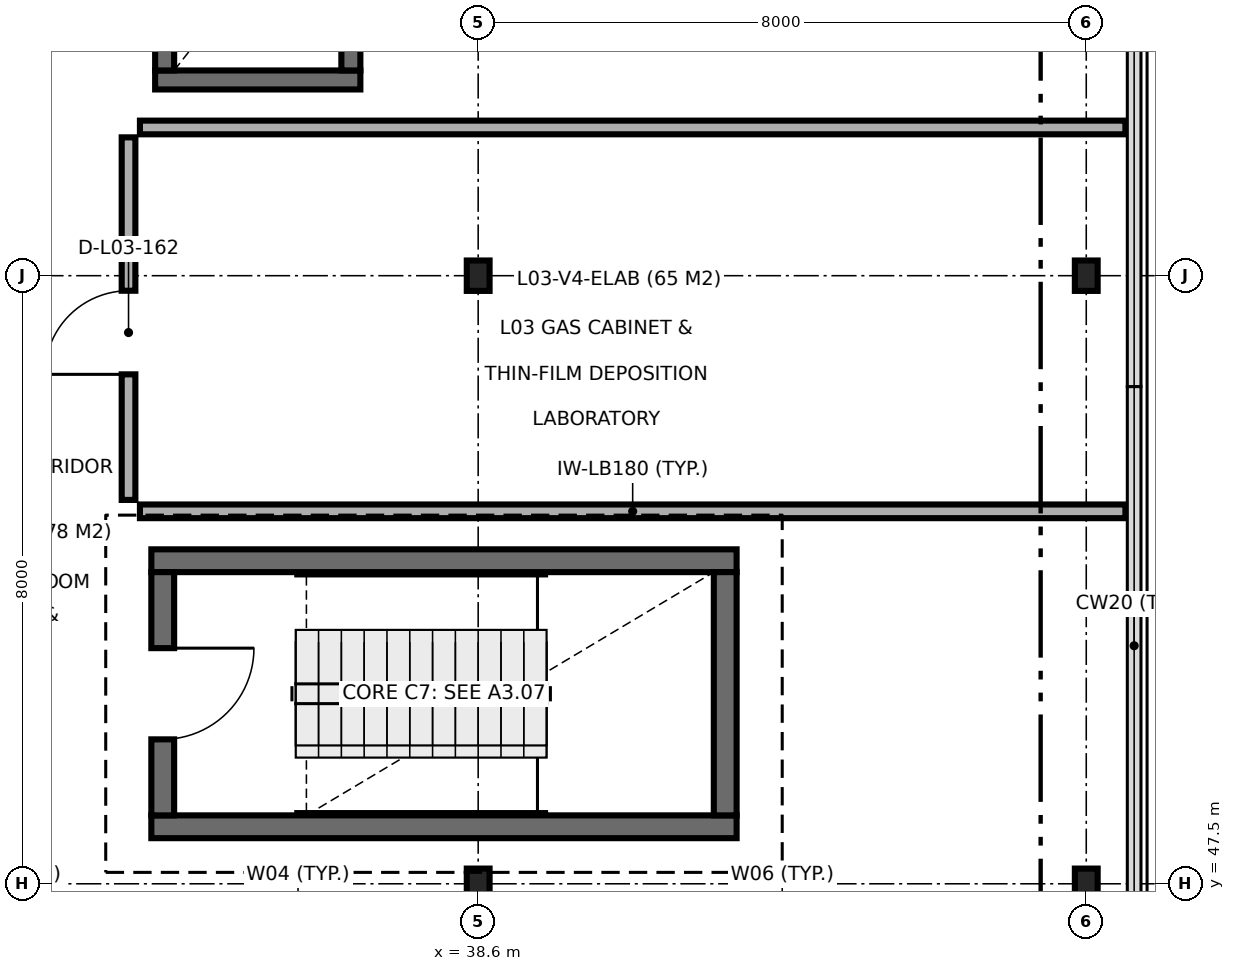
"""IFC4 building model, lengths in metres.
Left out: names, types, materials, properties, quantities, classifications, styles, units other than length and angle.
Written with IfcOpenShell. Run it as: python <this file> out.ifc"""

import sys

from ifc_helpers import new_model, si_unit, direction, frame, frame_2d, origin, origin_2d, place, context, subcontext, project, spatial, rectangle, i_section, extrude, element, fill, save


model = new_model("IFC4")
c1 = context("Model", 3, precision=1e-05, world=origin(), true_north=direction((0.0, 1.0)))
c2 = subcontext(c1, "Body", "Model", "MODEL_VIEW")
j1 = project(units=[si_unit("LENGTHUNIT", "METRE"), si_unit("PLANEANGLEUNIT", "RADIAN")], contexts=[c1])
p1 = place(None, origin())
s1 = spatial("IfcSite", under=j1, at=p1, CompositionType="ELEMENT")
p2 = place(p1, origin())
s2 = spatial("IfcBuilding", under=s1, at=p2, CompositionType="ELEMENT")
p3 = place(p2, frame((0.0, 0.0, 13.8)))
s3 = spatial("IfcBuildingStorey", under=s2, at=p3, CompositionType="ELEMENT", Elevation=13.8)
for number, where, z_axis, x_axis in (
    (1, (38.6, 47.5, 0.0), (0.0, 0.0, 1.0), (1.0, 0.0, 0.0)),
    (2, (38.6, 55.5, 0.0), (0.0, 0.0, 1.0), (1.0, 0.0, 0.0)),
    (3, (46.6, 47.5, 0.0), (0.0, 0.0, 1.0), (1.0, 0.0, 0.0)),
    (4, (46.6, 55.5, 0.0), (0.0, 0.0, 1.0), (1.0, 0.0, 0.0)),
):
    element("IfcColumn", number, at=place(p3, frame(where, z_axis=z_axis, x_axis=x_axis)), inside=s3, PredefinedType="COLUMN", context=c2, shape_type="SweptSolid", body=[
        extrude(i_section(OverallWidth=0.3, OverallDepth=0.4, WebThickness=0.013, FlangeThickness=0.024, FilletRadius=0.027, at=origin_2d()), origin(), (0.0, 0.0, 1.0), 4.5),
    ])
for number, where, z_axis, x_axis in (
    (5, (34.3, 48.25, 0.0), (0.0, 0.0, 1.0), (1.0, 0.0, 0.0)),
    (6, (42.0, 51.75, 0.0), (0.0, 0.0, 1.0), (-1.0, 0.0, 0.0)),
):
    element("IfcWall", number, at=place(p3, frame(where, z_axis=z_axis, x_axis=x_axis)), inside=s3, PredefinedType="SHEAR", context=c2, shape_type="SweptSolid", body=[
        extrude(rectangle(XDim=7.7, YDim=0.3, at=frame_2d((3.85, 0.0))), origin(), (0.0, 0.0, 1.0), 4.5),
    ])
p4 = place(p3, frame((34.45, 51.6, 0.0), z_axis=(0.0, 0.0, 1.0), x_axis=(0.0, -1.0, 0.0)))
e7 = element("IfcWall", 7, at=p4, inside=s3, PredefinedType="SHEAR", context=c2, shape_type="SweptSolid", body=[
    extrude(rectangle(XDim=3.2, YDim=0.3, at=frame_2d((1.6, 0.0))), origin(), (0.0, 0.0, 1.0), 4.5),
])
p5 = place(p4, frame((1.0, 0.0, 0.0)))
e8 = element("IfcOpeningElement", 8, at=p5, cuts=e7, PredefinedType="OPENING", context=c2, shape_type="SweptSolid", body=[
    extrude(rectangle(XDim=1.2, YDim=2.15, at=frame_2d((0.6, 1.075))), frame((0.0, 0.16, 0.0), z_axis=(0.0, -1.0, 0.0), x_axis=(1.0, 0.0, 0.0)), (0.0, 0.0, 1.0), 0.32),
])
p6 = place(p3, frame((41.85, 48.4, 0.0), z_axis=(0.0, 0.0, 1.0), x_axis=(0.0, 1.0, 0.0)))
e9 = element("IfcWall", 9, at=p6, inside=s3, PredefinedType="SHEAR", context=c2, shape_type="SweptSolid", body=[
    extrude(rectangle(XDim=3.2, YDim=0.3, at=frame_2d((1.6, 0.0))), origin(), (0.0, 0.0, 1.0), 4.5),
])
p7 = place(p3, frame((34.35, 58.075, 0.0), z_axis=(0.0, 0.0, 1.0), x_axis=(1.0, 0.0, 0.0)))
e10 = element("IfcWall", 10, at=p7, inside=s3, PredefinedType="SHEAR", context=c2, shape_type="SweptSolid", body=[
    extrude(rectangle(XDim=2.7, YDim=0.25, at=frame_2d((1.35, 0.0))), origin(), (0.0, 0.0, 1.0), 4.5),
])
p8 = place(p3, frame((34.475, 61.0, 0.0), z_axis=(0.0, 0.0, 1.0), x_axis=(0.0, -1.0, 0.0)))
e11 = element("IfcWall", 11, at=p8, inside=s3, PredefinedType="SHEAR", context=c2, shape_type="SweptSolid", body=[
    extrude(rectangle(XDim=2.8, YDim=0.25, at=frame_2d((1.4, 0.0))), origin(), (0.0, 0.0, 1.0), 4.5),
])
p9 = place(p8, frame((0.85, 0.0, 0.0)))
e12 = element("IfcOpeningElement", 12, at=p9, cuts=e11, PredefinedType="OPENING", context=c2, shape_type="SweptSolid", body=[
    extrude(rectangle(XDim=1.1, YDim=2.15, at=frame_2d((0.55, 1.075))), frame((0.0, 0.135, 0.0), z_axis=(0.0, -1.0, 0.0), x_axis=(1.0, 0.0, 0.0)), (0.0, 0.0, 1.0), 0.27),
])
p10 = place(p3, frame((36.925, 58.2, 0.0), z_axis=(0.0, 0.0, 1.0), x_axis=(0.0, 1.0, 0.0)))
e13 = element("IfcWall", 13, at=p10, inside=s3, PredefinedType="SHEAR", context=c2, shape_type="SweptSolid", body=[
    extrude(rectangle(XDim=2.8, YDim=0.25, at=frame_2d((1.4, 0.0))), origin(), (0.0, 0.0, 1.0), 4.5),
])
for number, where, z_axis, x_axis in (
    (14, (34.15, 52.4, 0.0), (0.0, 0.0, 1.0), (1.0, 0.0, 0.0)),
    (15, (34.15, 57.45, 0.0), (0.0, 0.0, 1.0), (1.0, 0.0, 0.0)),
):
    element("IfcWall", number, at=place(p3, frame(where, z_axis=z_axis, x_axis=x_axis)), inside=s3, PredefinedType="PARTITIONING", context=c2, shape_type="SweptSolid", body=[
        extrude(rectangle(XDim=12.965, YDim=0.18, at=frame_2d((6.482, 0.0))), origin(), (0.0, 0.0, 1.0), 4.25),
    ])
p11 = place(p3, frame((34.0, 52.55, 0.0), z_axis=(0.0, 0.0, 1.0), x_axis=(0.0, 1.0, 0.0)))
e16 = element("IfcWall", 16, at=p11, inside=s3, PredefinedType="PARTITIONING", context=c2, shape_type="SweptSolid", body=[
    extrude(rectangle(XDim=4.77, YDim=0.18, at=frame_2d((2.385, 0.0))), origin(), (0.0, 0.0, 1.0), 4.25),
])
p12 = place(p11, frame((1.652, 0.0, 0.0)))
e17 = element("IfcOpeningElement", 17, at=p12, cuts=e16, PredefinedType="OPENING", context=c2, shape_type="SweptSolid", body=[
    extrude(rectangle(XDim=1.1, YDim=2.15, at=frame_2d((0.55, 1.075))), frame((0.0, 0.1, 0.0), z_axis=(0.0, -1.0, 0.0), x_axis=(1.0, 0.0, 0.0)), (0.0, 0.0, 1.0), 0.2),
])
p13 = place(p5, origin())
e18 = element("IfcDoor", 18, at=p13, inside=s3, OperationType="SINGLE_SWING_LEFT", PredefinedType="DOOR", context=c2, shape_type="SweptSolid", body=[
    extrude(rectangle(XDim=1.2, YDim=2.15, at=frame_2d((0.6, 1.075))), frame((0.0, 0.025, 0.0), z_axis=(0.0, -1.0, 0.0), x_axis=(1.0, 0.0, 0.0)), (0.0, 0.0, 1.0), 0.05),
])
fill(e8, e18)
p14 = place(p12, origin())
e19 = element("IfcDoor", 19, at=p14, inside=s3, OperationType="SINGLE_SWING_LEFT", PredefinedType="DOOR", context=c2, shape_type="SweptSolid", body=[
    extrude(rectangle(XDim=1.1, YDim=2.15, at=frame_2d((0.55, 1.075))), frame((0.0, 0.025, 0.0), z_axis=(0.0, -1.0, 0.0), x_axis=(1.0, 0.0, 0.0)), (0.0, 0.0, 1.0), 0.05),
])
fill(e17, e19)
save(model, sys.argv[1])
